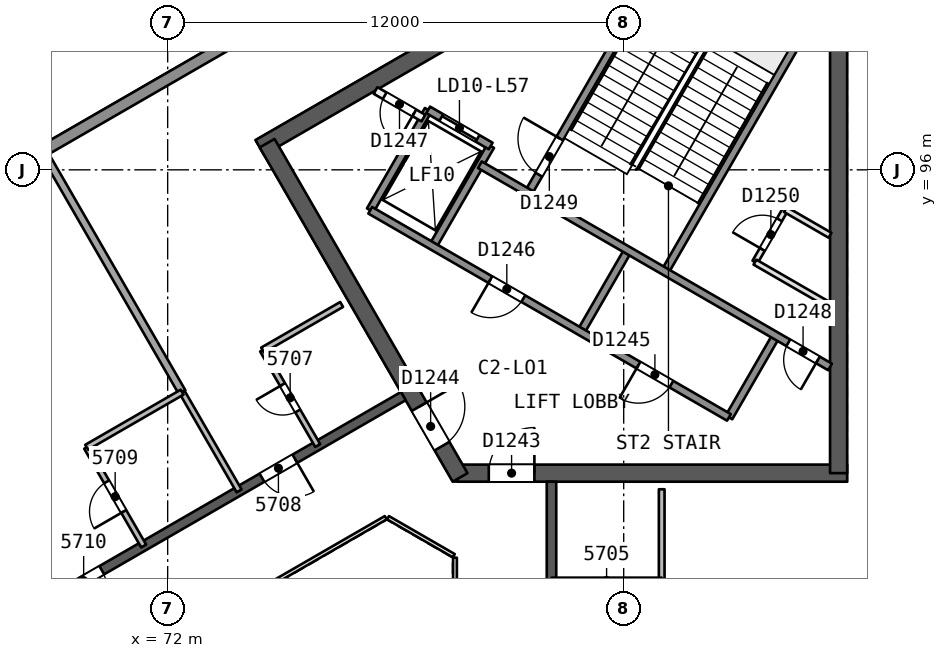
"""IFC4 building model, lengths in metres.
Left out: names, types, materials, properties, quantities, classifications, styles, units other than length and angle.
Written with IfcOpenShell. Run it as: python <this file> out.ifc"""

import sys

from ifc_helpers import new_model, si_unit, direction, frame, frame_2d, origin, place, context, subcontext, project, spatial, rectangle, extrude, element, fill, save


model = new_model("IFC4")
c1 = context("Model", 3, precision=1e-05, world=origin(), true_north=direction((0.0, 1.0)))
c2 = subcontext(c1, "Body", "Model", "MODEL_VIEW")
j1 = project(units=[si_unit("LENGTHUNIT", "METRE"), si_unit("PLANEANGLEUNIT", "RADIAN")], contexts=[c1])
p1 = place(None, origin())
s1 = spatial("IfcSite", under=j1, at=p1, CompositionType="ELEMENT")
p2 = place(p1, origin())
s2 = spatial("IfcBuilding", under=s1, at=p2, CompositionType="ELEMENT")
p3 = place(p2, frame((0.0, 0.0, 231.7)))
s3 = spatial("IfcBuildingStorey", under=s2, at=p3, CompositionType="ELEMENT", Elevation=231.7)
p4 = place(p3, frame((79.63, 88.019, 0.0), z_axis=(0.0, 0.0, 1.0), x_axis=(1.0, 0.0, 0.0)))
e1 = element("IfcWall", 1, at=p4, inside=s3, PredefinedType="SHEAR", context=c2, shape_type="SweptSolid", body=[
    extrude(rectangle(XDim=10.25, YDim=0.45, at=frame_2d((5.125, 0.0))), origin(), (0.0, 0.0, 1.0), 3.7),
])
p5 = place(p4, frame((0.82, 0.0, 0.0)))
e2 = element("IfcOpeningElement", 2, at=p5, cuts=e1, PredefinedType="OPENING", context=c2, shape_type="SweptSolid", body=[
    extrude(rectangle(XDim=1.2, YDim=2.1, at=frame_2d((0.6, 1.05))), frame((0.0, 0.235, 0.0), z_axis=(0.0, -1.0, 0.0), x_axis=(1.0, 0.0, 0.0)), (0.0, 0.0, 1.0), 0.471),
])
p6 = place(p3, frame((89.655, 88.019, 0.0), z_axis=(0.0, 0.0, 1.0), x_axis=(0.0, 1.0, 0.0)))
e3 = element("IfcWall", 3, at=p6, inside=s3, PredefinedType="SHEAR", context=c2, shape_type="SweptSolid", body=[
    extrude(rectangle(XDim=14.108, YDim=0.45, at=frame_2d((7.054, 0.0))), origin(), (0.0, 0.0, 1.0), 3.7),
])
p7 = place(p3, frame((86.723, 103.69, 0.0), z_axis=(0.0, 0.0, 1.0), x_axis=(-0.866022713978, -0.500004658852, 0.0)))
e4 = element("IfcWall", 4, at=p7, inside=s3, PredefinedType="SHEAR", context=c2, shape_type="SweptSolid", body=[
    extrude(rectangle(XDim=14.203, YDim=0.45, at=frame_2d((7.102, 0.0))), origin(), (0.0, 0.0, 1.0), 3.7),
])
p8 = place(p3, frame((74.617, 96.701, 0.0), z_axis=(0.0, 0.0, 1.0), x_axis=(0.499994385119, -0.866028645513, 0.0)))
e5 = element("IfcWall", 5, at=p8, inside=s3, PredefinedType="SHEAR", context=c2, shape_type="SweptSolid", body=[
    extrude(rectangle(XDim=10.155, YDim=0.45, at=frame_2d((5.077, 0.0))), origin(), (0.0, 0.0, 1.0), 3.7),
])
p9 = place(p8, frame((8.005, 0.0, 0.0)))
e6 = element("IfcOpeningElement", 6, at=p9, cuts=e5, PredefinedType="OPENING", context=c2, shape_type="SweptSolid", body=[
    extrude(rectangle(XDim=1.2, YDim=2.1, at=frame_2d((0.6, 1.05))), frame((0.0, 0.235, 0.0), z_axis=(0.0, -1.0, 0.0), x_axis=(1.0, 0.0, 0.0)), (0.0, 0.0, 1.0), 0.471),
])
p10 = place(p3, frame((82.1, 72.206, 0.0), z_axis=(0.0, 0.0, 1.0), x_axis=(0.0, 1.0, 0.0)))
e7 = element("IfcWall", 7, at=p10, inside=s3, PredefinedType="SHEAR", context=c2, shape_type="SweptSolid", body=[
    extrude(rectangle(XDim=15.588, YDim=0.25, at=frame_2d((7.794, 0.0))), origin(), (0.0, 0.0, 1.0), 3.3),
])
p11 = place(p10, frame((2.15, 0.0, 0.0)))
e8 = element("IfcOpeningElement", 8, at=p11, cuts=e7, PredefinedType="OPENING", context=c2, shape_type="SweptSolid", body=[
    extrude(rectangle(XDim=1.0, YDim=2.1, at=frame_2d((0.5, 1.05))), frame((0.0, 0.135, 0.0), z_axis=(0.0, -1.0, 0.0), x_axis=(1.0, 0.0, 0.0)), (0.0, 0.0, 1.0), 0.271),
])
p12 = place(p10, frame((7.662, 0.0, 0.0)))
e9 = element("IfcOpeningElement", 9, at=p12, cuts=e7, PredefinedType="OPENING", context=c2, shape_type="SweptSolid", body=[
    extrude(rectangle(XDim=1.2, YDim=2.4, at=frame_2d((0.6, 1.2))), frame((0.0, 0.135, 0.0), z_axis=(0.0, -1.0, 0.0), x_axis=(1.0, 0.0, 0.0)), (0.0, 0.0, 1.0), 0.271),
])
p13 = place(p10, frame((11.606, 0.0, 0.0)))
e10 = element("IfcOpeningElement", 10, at=p13, cuts=e7, PredefinedType="OPENING", context=c2, shape_type="SweptSolid", body=[
    extrude(rectangle(XDim=1.0, YDim=2.1, at=frame_2d((0.5, 1.05))), frame((0.0, 0.135, 0.0), z_axis=(0.0, -1.0, 0.0), x_axis=(1.0, 0.0, 0.0)), (0.0, 0.0, 1.0), 0.271),
])
p14 = place(p3, frame((78.2, 90.046, 0.0), z_axis=(0.0, 0.0, 1.0), x_axis=(-0.866026492143, -0.499998114903, 0.0)))
e11 = element("IfcWall", 11, at=p14, inside=s3, PredefinedType="SHEAR", context=c2, shape_type="SweptSolid", body=[
    extrude(rectangle(XDim=15.588, YDim=0.25, at=frame_2d((7.794, 0.0))), origin(), (0.0, 0.0, 1.0), 3.3),
])
p15 = place(p14, frame((3.294, 0.0, 0.0)))
e12 = element("IfcOpeningElement", 12, at=p15, cuts=e11, PredefinedType="OPENING", context=c2, shape_type="SweptSolid", body=[
    extrude(rectangle(XDim=1.0, YDim=2.1, at=frame_2d((0.5, 1.05))), frame((0.0, 0.135, 0.0), z_axis=(0.0, -1.0, 0.0), x_axis=(1.0, 0.0, 0.0)), (0.0, 0.0, 1.0), 0.271),
])
p16 = place(p14, frame((9.162, 0.0, 0.0)))
e13 = element("IfcOpeningElement", 13, at=p16, cuts=e11, PredefinedType="OPENING", context=c2, shape_type="SweptSolid", body=[
    extrude(rectangle(XDim=1.1, YDim=2.1, at=frame_2d((0.55, 1.05))), frame((0.0, 0.135, 0.0), z_axis=(0.0, -1.0, 0.0), x_axis=(1.0, 0.0, 0.0)), (0.0, 0.0, 1.0), 0.271),
])
p17 = place(p14, frame((11.762, 0.0, 0.0)))
e14 = element("IfcOpeningElement", 14, at=p17, cuts=e11, PredefinedType="OPENING", context=c2, shape_type="SweptSolid", body=[
    extrude(rectangle(XDim=1.0, YDim=2.1, at=frame_2d((0.5, 1.05))), frame((0.0, 0.135, 0.0), z_axis=(0.0, -1.0, 0.0), x_axis=(1.0, 0.0, 0.0)), (0.0, 0.0, 1.0), 0.271),
])
p18 = place(p3, frame((85.0, 87.595, 0.0), z_axis=(0.0, 0.0, 1.0), x_axis=(0.0, -1.0, 0.0)))
e15 = element("IfcWall", 15, at=p18, inside=s3, PredefinedType="PARTITIONING", context=c2, shape_type="SweptSolid", body=[
    extrude(rectangle(XDim=2.401, YDim=0.15, at=frame_2d((1.2, 0.0))), origin(), (0.0, 0.0, 1.0), 3.3),
])
p19 = place(p3, frame((85.0, 85.194, 0.0), z_axis=(0.0, 0.0, 1.0), x_axis=(-1.0, 0.0, 0.0)))
e16 = element("IfcWall", 16, at=p19, inside=s3, PredefinedType="PARTITIONING", context=c2, shape_type="SweptSolid", body=[
    extrude(rectangle(XDim=2.9, YDim=0.15, at=frame_2d((1.45, 0.0))), origin(), (0.0, 0.0, 1.0), 3.3),
])
p20 = place(p19, frame((1.05, 0.0, 0.0)))
e17 = element("IfcOpeningElement", 17, at=p20, cuts=e16, PredefinedType="OPENING", context=c2, shape_type="SweptSolid", body=[
    extrude(rectangle(XDim=0.8, YDim=2.1, at=frame_2d((0.4, 1.05))), frame((0.0, 0.085, 0.0), z_axis=(0.0, -1.0, 0.0), x_axis=(1.0, 0.0, 0.0)), (0.0, 0.0, 1.0), 0.171),
])
p21 = place(p3, frame((75.948, 88.746, 0.0), z_axis=(0.0, 0.0, 1.0), x_axis=(-0.499987231761, 0.866032775405, 0.0)))
e18 = element("IfcWall", 18, at=p21, inside=s3, PredefinedType="PARTITIONING", context=c2, shape_type="SweptSolid", body=[
    extrude(rectangle(XDim=2.9, YDim=0.15, at=frame_2d((1.45, 0.0))), origin(), (0.0, 0.0, 1.0), 3.3),
])
p22 = place(p21, frame((1.05, 0.0, 0.0)))
e19 = element("IfcOpeningElement", 19, at=p22, cuts=e18, PredefinedType="OPENING", context=c2, shape_type="SweptSolid", body=[
    extrude(rectangle(XDim=0.8, YDim=2.1, at=frame_2d((0.4, 1.05))), frame((0.0, 0.085, 0.0), z_axis=(0.0, -1.0, 0.0), x_axis=(1.0, 0.0, 0.0)), (0.0, 0.0, 1.0), 0.171),
])
p23 = place(p3, frame((74.498, 91.257, 0.0), z_axis=(0.0, 0.0, 1.0), x_axis=(0.866038271014, 0.499977712642, 0.0)))
e20 = element("IfcWall", 20, at=p23, inside=s3, PredefinedType="PARTITIONING", context=c2, shape_type="SweptSolid", body=[
    extrude(rectangle(XDim=2.401, YDim=0.15, at=frame_2d((1.2, 0.0))), origin(), (0.0, 0.0, 1.0), 3.3),
])
p24 = place(p3, frame((68.791, 96.367, 0.0), z_axis=(0.0, 0.0, 1.0), x_axis=(0.499994271117, -0.866028711331, 0.0)))
e21 = element("IfcWall", 21, at=p24, inside=s3, PredefinedType="PARTITIONING", context=c2, shape_type="SweptSolid", body=[
    extrude(rectangle(XDim=7.179, YDim=0.2, at=frame_2d((3.589, 0.0))), origin(), (0.0, 0.0, 1.0), 3.3),
])
p25 = place(p3, frame((72.38, 90.15, 0.0), z_axis=(0.0, 0.0, 1.0), x_axis=(0.499990139034, -0.866031096941, 0.0)))
e22 = element("IfcWall", 22, at=p25, inside=s3, PredefinedType="PARTITIONING", context=c2, shape_type="SweptSolid", body=[
    extrude(rectangle(XDim=3.0, YDim=0.15, at=frame_2d((1.5, 0.0))), origin(), (0.0, 0.0, 1.0), 3.3),
])
p26 = place(p3, frame((71.368, 86.102, 0.0), z_axis=(0.0, 0.0, 1.0), x_axis=(-0.50002537861, 0.866010750942, 0.0)))
e23 = element("IfcWall", 23, at=p26, inside=s3, PredefinedType="PARTITIONING", context=c2, shape_type="SweptSolid", body=[
    extrude(rectangle(XDim=3.0, YDim=0.15, at=frame_2d((1.5, 0.0))), origin(), (0.0, 0.0, 1.0), 3.3),
])
p27 = place(p26, frame((1.05, 0.0, 0.0)))
e24 = element("IfcOpeningElement", 24, at=p27, cuts=e23, PredefinedType="OPENING", context=c2, shape_type="SweptSolid", body=[
    extrude(rectangle(XDim=0.9, YDim=2.1, at=frame_2d((0.45, 1.05))), frame((0.0, 0.085, 0.0), z_axis=(0.0, -1.0, 0.0), x_axis=(1.0, 0.0, 0.0)), (0.0, 0.0, 1.0), 0.171),
])
p28 = place(p3, frame((69.868, 88.7, 0.0), z_axis=(0.0, 0.0, 1.0), x_axis=(0.865996321171, 0.50005036918, 0.0)))
e25 = element("IfcWall", 25, at=p28, inside=s3, PredefinedType="PARTITIONING", context=c2, shape_type="SweptSolid", body=[
    extrude(rectangle(XDim=2.9, YDim=0.15, at=frame_2d((1.45, 0.0))), origin(), (0.0, 0.0, 1.0), 3.3),
])
p29 = place(p3, frame((44.584, 82.563, 0.0), z_axis=(0.0, 0.0, 1.0), x_axis=(0.866023992326, 0.500002444709, 0.0)))
e26 = element("IfcWall", 26, at=p29, inside=s3, PredefinedType="SOLIDWALL", context=c2, shape_type="SweptSolid", body=[
    extrude(rectangle(XDim=50.118, YDim=0.3, at=frame_2d((25.059, 0.0))), origin(), (0.0, 0.0, 1.0), 3.3),
])
p30 = place(p29, frame((23.391, 0.0, 0.0)))
e27 = element("IfcOpeningElement", 27, at=p30, cuts=e26, PredefinedType="OPENING", context=c2, shape_type="SweptSolid", body=[
    extrude(rectangle(XDim=2.4, YDim=2.4, at=frame_2d((1.2, 1.2))), frame((0.0, 0.161, 0.0), z_axis=(0.0, -1.0, 0.0), x_axis=(1.0, 0.0, 0.0)), (0.0, 0.0, 1.0), 0.321),
])
p31 = place(p29, frame((37.835, 0.0, 0.0)))
e28 = element("IfcOpeningElement", 28, at=p31, cuts=e26, PredefinedType="OPENING", context=c2, shape_type="SweptSolid", body=[
    extrude(rectangle(XDim=2.4, YDim=2.4, at=frame_2d((1.2, 1.2))), frame((0.0, 0.161, 0.0), z_axis=(0.0, -1.0, 0.0), x_axis=(1.0, 0.0, 0.0)), (0.0, 0.0, 1.0), 0.321),
])
p32 = place(p29, frame((9.416, 0.0, 0.0)))
e29 = element("IfcOpeningElement", 29, at=p32, cuts=e26, PredefinedType="OPENING", context=c2, shape_type="SweptSolid", body=[
    extrude(rectangle(XDim=2.4, YDim=2.4, at=frame_2d((1.2, 1.2))), frame((0.0, 0.161, 0.0), z_axis=(0.0, -1.0, 0.0), x_axis=(1.0, 0.0, 0.0)), (0.0, 0.0, 1.0), 0.321),
])
p33 = place(p3, frame((86.77, 89.486, 0.0), z_axis=(0.0, 0.0, 1.0), x_axis=(0.499961042966, 0.86604789447, 0.0)))
e30 = element("IfcWall", 30, at=p33, inside=s3, PredefinedType="SOLIDWALL", context=c2, shape_type="SweptSolid", body=[
    extrude(rectangle(XDim=2.48, YDim=0.2, at=frame_2d((1.24, 0.0))), origin(), (0.0, 0.0, 1.0), 3.3),
])
p34 = place(p3, frame((87.454, 93.571, 0.0), z_axis=(0.0, 0.0, 1.0), x_axis=(0.499995408039, 0.866028054938, 0.0)))
e31 = element("IfcWall", 31, at=p34, inside=s3, PredefinedType="PARTITIONING", context=c2, shape_type="SweptSolid", body=[
    extrude(rectangle(XDim=1.6, YDim=0.15, at=frame_2d((0.8, 0.0))), origin(), (0.0, 0.0, 1.0), 3.3),
])
p35 = place(p34, frame((0.387, 0.0, 0.0)))
e32 = element("IfcOpeningElement", 32, at=p35, cuts=e31, PredefinedType="OPENING", context=c2, shape_type="SweptSolid", body=[
    extrude(rectangle(XDim=0.9, YDim=2.1, at=frame_2d((0.45, 1.05))), frame((0.0, 0.085, 0.0), z_axis=(0.0, -1.0, 0.0), x_axis=(1.0, 0.0, 0.0)), (0.0, 0.0, 1.0), 0.171),
])
p36 = place(p3, frame((85.087, 93.321, 0.0), z_axis=(0.0, 0.0, 1.0), x_axis=(0.500019787375, 0.866013979237, 0.0)))
e33 = element("IfcWall", 33, at=p36, inside=s3, PredefinedType="SOLIDWALL", context=c2, shape_type="SweptSolid", body=[
    extrude(rectangle(XDim=7.7, YDim=0.2, at=frame_2d((3.85, 0.0))), origin(), (0.0, 0.0, 1.0), 3.3),
])
p37 = place(p3, frame((82.873, 91.736, 0.0), z_axis=(0.0, 0.0, 1.0), x_axis=(0.499961042966, 0.86604789447, 0.0)))
e34 = element("IfcWall", 34, at=p37, inside=s3, PredefinedType="SOLIDWALL", context=c2, shape_type="SweptSolid", body=[
    extrude(rectangle(XDim=2.48, YDim=0.2, at=frame_2d((1.24, 0.0))), origin(), (0.0, 0.0, 1.0), 3.3),
])
p38 = place(p3, frame((81.493, 95.396, 0.0), z_axis=(0.0, 0.0, 1.0), x_axis=(0.500006057782, 0.866021906294, 0.0)))
e35 = element("IfcWall", 35, at=p38, inside=s3, PredefinedType="SOLIDWALL", context=c2, shape_type="SweptSolid", body=[
    extrude(rectangle(XDim=7.7, YDim=0.2, at=frame_2d((3.85, 0.0))), origin(), (0.0, 0.0, 1.0), 3.3),
])
p39 = place(p38, frame((0.55, 0.0, 0.0)))
e36 = element("IfcOpeningElement", 36, at=p39, cuts=e35, PredefinedType="OPENING", context=c2, shape_type="SweptSolid", body=[
    extrude(rectangle(XDim=1.1, YDim=2.1, at=frame_2d((0.55, 1.05))), frame((0.0, 0.11, 0.0), z_axis=(0.0, -1.0, 0.0), x_axis=(1.0, 0.0, 0.0)), (0.0, 0.0, 1.0), 0.221),
])
for number, where, z_axis, x_axis in (
    (37, (78.976, 93.986, 0.0), (0.0, 0.0, 1.0), (0.5, 0.866, 0.0)),
    (38, (77.33, 94.936, 0.0), (0.0, 0.0, 1.0), (0.5, 0.866, 0.0)),
):
    element("IfcWall", number, at=place(p3, frame(where, z_axis=z_axis, x_axis=x_axis)), inside=s3, PredefinedType="SOLIDWALL", context=c2, shape_type="SweptSolid", body=[
        extrude(rectangle(XDim=3.05, YDim=0.2, at=frame_2d((1.525, 0.0))), origin(), (0.0, 0.0, 1.0), 3.3),
    ])
p40 = place(p3, frame((86.77, 89.486, 0.0), z_axis=(0.0, 0.0, 1.0), x_axis=(-0.86601811187, 0.500012629753, 0.0)))
e39 = element("IfcWall", 39, at=p40, inside=s3, PredefinedType="SOLIDWALL", context=c2, shape_type="SweptSolid", body=[
    extrude(rectangle(XDim=10.9, YDim=0.2, at=frame_2d((5.45, 0.0))), origin(), (0.0, 0.0, 1.0), 3.3),
])
p41 = place(p40, frame((1.75, 0.0, 0.0)))
e40 = element("IfcOpeningElement", 40, at=p41, cuts=e39, PredefinedType="OPENING", context=c2, shape_type="SweptSolid", body=[
    extrude(rectangle(XDim=1.0, YDim=2.1, at=frame_2d((0.5, 1.05))), frame((0.0, 0.11, 0.0), z_axis=(0.0, -1.0, 0.0), x_axis=(1.0, 0.0, 0.0)), (0.0, 0.0, 1.0), 0.221),
])
p42 = place(p40, frame((6.25, 0.0, 0.0)))
e41 = element("IfcOpeningElement", 41, at=p42, cuts=e39, PredefinedType="OPENING", context=c2, shape_type="SweptSolid", body=[
    extrude(rectangle(XDim=1.0, YDim=2.1, at=frame_2d((0.5, 1.05))), frame((0.0, 0.11, 0.0), z_axis=(0.0, -1.0, 0.0), x_axis=(1.0, 0.0, 0.0)), (0.0, 0.0, 1.0), 0.221),
])
p43 = place(p3, frame((89.43, 90.814, 0.0), z_axis=(0.0, 0.0, 1.0), x_axis=(-0.866018983788, 0.500011119594, 0.0)))
e42 = element("IfcWall", 42, at=p43, inside=s3, PredefinedType="SOLIDWALL", context=c2, shape_type="SweptSolid", body=[
    extrude(rectangle(XDim=10.64, YDim=0.2, at=frame_2d((5.32, 0.0))), origin(), (0.0, 0.0, 1.0), 3.3),
])
p44 = place(p43, frame((0.37, 0.0, 0.0)))
e43 = element("IfcOpeningElement", 43, at=p44, cuts=e42, PredefinedType="OPENING", context=c2, shape_type="SweptSolid", body=[
    extrude(rectangle(XDim=0.9, YDim=2.1, at=frame_2d((0.45, 1.05))), frame((0.0, 0.11, 0.0), z_axis=(0.0, -1.0, 0.0), x_axis=(1.0, 0.0, 0.0)), (0.0, 0.0, 1.0), 0.221),
])
p45 = place(p3, frame((78.73, 97.361, 0.0), z_axis=(0.0, 0.0, 1.0), x_axis=(-0.866045896294, 0.499964504253, 0.0)))
e44 = element("IfcWall", 44, at=p45, inside=s3, PredefinedType="PARTITIONING", context=c2, shape_type="SweptSolid", body=[
    extrude(rectangle(XDim=1.455, YDim=0.2, at=frame_2d((0.728, 0.0))), origin(), (0.0, 0.0, 1.0), 3.3),
])
p46 = place(p45, frame((0.278, 0.0, 0.0)))
e45 = element("IfcOpeningElement", 45, at=p46, cuts=e44, PredefinedType="OPENING", context=c2, shape_type="SweptSolid", body=[
    extrude(rectangle(XDim=0.9, YDim=2.1, at=frame_2d((0.45, 1.05))), frame((0.0, 0.11, 0.0), z_axis=(0.0, -1.0, 0.0), x_axis=(1.0, 0.0, 0.0)), (0.0, 0.0, 1.0), 0.221),
])
p47 = place(p3, frame((80.5, 96.627, 0.0), z_axis=(0.0, 0.0, 1.0), x_axis=(-0.86601224135, 0.500022797313, 0.0)))
e46 = element("IfcWall", 46, at=p47, inside=s3, PredefinedType="SOLIDWALL", context=c2, shape_type="SweptSolid", body=[
    extrude(rectangle(XDim=1.9, YDim=0.2, at=frame_2d((0.95, 0.0))), origin(), (0.0, 0.0, 1.0), 3.3),
])
p48 = place(p47, frame((0.4, 0.0, 0.0)))
e47 = element("IfcOpeningElement", 47, at=p48, cuts=e46, PredefinedType="OPENING", context=c2, shape_type="SweptSolid", body=[
    extrude(rectangle(XDim=1.1, YDim=2.1, at=frame_2d((0.55, 1.05))), frame((0.0, 0.11, 0.0), z_axis=(0.0, -1.0, 0.0), x_axis=(1.0, 0.0, 0.0)), (0.0, 0.0, 1.0), 0.221),
])
p49 = place(p3, frame((89.43, 92.43, 0.0), z_axis=(0.0, 0.0, 1.0), x_axis=(-0.866048373726, 0.499960212783, 0.0)))
e48 = element("IfcWall", 48, at=p49, inside=s3, PredefinedType="PARTITIONING", context=c2, shape_type="SweptSolid", body=[
    extrude(rectangle(XDim=2.281, YDim=0.15, at=frame_2d((1.141, 0.0))), origin(), (0.0, 0.0, 1.0), 3.3),
])
p50 = place(p3, frame((89.43, 94.278, 0.0), z_axis=(0.0, 0.0, 1.0), x_axis=(-0.865987941628, 0.500064880745, 0.0)))
e49 = element("IfcWall", 49, at=p50, inside=s3, PredefinedType="PARTITIONING", context=c2, shape_type="SweptSolid", body=[
    extrude(rectangle(XDim=1.358, YDim=0.15, at=frame_2d((0.679, 0.0))), origin(), (0.0, 0.0, 1.0), 3.3),
])
p51 = place(p3, frame((79.56, 74.206, 0.0), z_axis=(0.0, 0.0, 1.0), x_axis=(0.0, 1.0, 0.0)))
e50 = element("IfcWall", 50, at=p51, inside=s3, PredefinedType="PARTITIONING", context=c2, shape_type="SweptSolid", body=[
    extrude(rectangle(XDim=11.588, YDim=0.1, at=frame_2d((5.794, 0.0))), origin(), (0.0, 0.0, 1.0), 3.3),
])
p52 = place(p3, frame((79.53, 85.846, 0.0), z_axis=(0.0, 0.0, 1.0), x_axis=(-0.866041268327, 0.499972520799, 0.0)))
e51 = element("IfcWall", 51, at=p52, inside=s3, PredefinedType="PARTITIONING", context=c2, shape_type="SweptSolid", body=[
    extrude(rectangle(XDim=2.0, YDim=0.1, at=frame_2d((1.0, 0.0))), origin(), (0.0, 0.0, 1.0), 3.3),
])
p53 = place(p3, frame((77.738, 86.846, 0.0), z_axis=(0.0, 0.0, 1.0), x_axis=(-0.866026658274, -0.499997827154, 0.0)))
e52 = element("IfcWall", 52, at=p53, inside=s3, PredefinedType="PARTITIONING", context=c2, shape_type="SweptSolid", body=[
    extrude(rectangle(XDim=11.588, YDim=0.1, at=frame_2d((5.794, 0.0))), origin(), (0.0, 0.0, 1.0), 3.3),
])
p54 = place(p22, origin())
e53 = element("IfcDoor", 53, at=p54, inside=s3, OperationType="SINGLE_SWING_RIGHT", PredefinedType="NOTDEFINED", context=c2, shape_type="SweptSolid", body=[
    extrude(rectangle(XDim=0.8, YDim=2.1, at=frame_2d((0.4, 1.05))), frame((0.0, 0.025, 0.0), z_axis=(0.0, -1.0, 0.0), x_axis=(1.0, 0.0, 0.0)), (0.0, 0.0, 1.0), 0.05),
])
fill(e19, e53)
p55 = place(p15, origin())
e54 = element("IfcDoor", 54, at=p55, inside=s3, OperationType="SINGLE_SWING_LEFT", PredefinedType="NOTDEFINED", context=c2, shape_type="SweptSolid", body=[
    extrude(rectangle(XDim=1.0, YDim=2.1, at=frame_2d((0.5, 1.05))), frame((0.0, 0.025, 0.0), z_axis=(0.0, -1.0, 0.0), x_axis=(1.0, 0.0, 0.0)), (0.0, 0.0, 1.0), 0.05),
])
fill(e12, e54)
p56 = place(p27, origin())
e55 = element("IfcDoor", 55, at=p56, inside=s3, OperationType="SINGLE_SWING_LEFT", PredefinedType="NOTDEFINED", context=c2, shape_type="SweptSolid", body=[
    extrude(rectangle(XDim=0.9, YDim=2.1, at=frame_2d((0.45, 1.05))), frame((0.0, 0.025, 0.0), z_axis=(0.0, -1.0, 0.0), x_axis=(1.0, 0.0, 0.0)), (0.0, 0.0, 1.0), 0.05),
])
fill(e24, e55)
p57 = place(p16, origin())
e56 = element("IfcDoor", 56, at=p57, inside=s3, OperationType="SINGLE_SWING_RIGHT", PredefinedType="NOTDEFINED", context=c2, shape_type="SweptSolid", body=[
    extrude(rectangle(XDim=1.1, YDim=2.1, at=frame_2d((0.55, 1.05))), frame((0.0, 0.025, 0.0), z_axis=(0.0, -1.0, 0.0), x_axis=(1.0, 0.0, 0.0)), (0.0, 0.0, 1.0), 0.05),
])
fill(e13, e56)
p58 = place(p5, origin())
e57 = element("IfcDoor", 57, at=p58, inside=s3, OperationType="SINGLE_SWING_RIGHT", PredefinedType="NOTDEFINED", context=c2, shape_type="SweptSolid", body=[
    extrude(rectangle(XDim=1.2, YDim=2.1, at=frame_2d((0.6, 1.05))), frame((0.0, 0.025, 0.0), z_axis=(0.0, -1.0, 0.0), x_axis=(1.0, 0.0, 0.0)), (0.0, 0.0, 1.0), 0.05),
])
fill(e2, e57)
p59 = place(p9, origin())
e58 = element("IfcDoor", 58, at=p59, inside=s3, OperationType="SINGLE_SWING_LEFT", PredefinedType="NOTDEFINED", context=c2, shape_type="SweptSolid", body=[
    extrude(rectangle(XDim=1.2, YDim=2.1, at=frame_2d((0.6, 1.05))), frame((0.0, 0.025, 0.0), z_axis=(0.0, -1.0, 0.0), x_axis=(1.0, 0.0, 0.0)), (0.0, 0.0, 1.0), 0.05),
])
fill(e6, e58)
p60 = place(p48, origin())
e59 = element("IfcDoor", 59, at=p60, inside=s3, OperationType="SLIDING_TO_RIGHT", PredefinedType="NOTDEFINED", context=c2, shape_type="SweptSolid", body=[
    extrude(rectangle(XDim=1.1, YDim=2.1, at=frame_2d((0.55, 1.05))), frame((0.0, 0.025, 0.0), z_axis=(0.0, -1.0, 0.0), x_axis=(1.0, 0.0, 0.0)), (0.0, 0.0, 1.0), 0.05),
])
fill(e47, e59)
p61 = place(p41, origin())
e60 = element("IfcDoor", 60, at=p61, inside=s3, OperationType="SINGLE_SWING_RIGHT", PredefinedType="NOTDEFINED", context=c2, shape_type="SweptSolid", body=[
    extrude(rectangle(XDim=1.0, YDim=2.1, at=frame_2d((0.5, 1.05))), frame((0.0, 0.025, 0.0), z_axis=(0.0, -1.0, 0.0), x_axis=(1.0, 0.0, 0.0)), (0.0, 0.0, 1.0), 0.05),
])
fill(e40, e60)
p62 = place(p42, origin())
e61 = element("IfcDoor", 61, at=p62, inside=s3, OperationType="SINGLE_SWING_RIGHT", PredefinedType="NOTDEFINED", context=c2, shape_type="SweptSolid", body=[
    extrude(rectangle(XDim=1.0, YDim=2.1, at=frame_2d((0.5, 1.05))), frame((0.0, 0.025, 0.0), z_axis=(0.0, -1.0, 0.0), x_axis=(1.0, 0.0, 0.0)), (0.0, 0.0, 1.0), 0.05),
])
fill(e41, e61)
p63 = place(p46, origin())
e62 = element("IfcDoor", 62, at=p63, inside=s3, OperationType="SINGLE_SWING_LEFT", PredefinedType="NOTDEFINED", context=c2, shape_type="SweptSolid", body=[
    extrude(rectangle(XDim=0.9, YDim=2.1, at=frame_2d((0.45, 1.05))), frame((0.0, 0.025, 0.0), z_axis=(0.0, -1.0, 0.0), x_axis=(1.0, 0.0, 0.0)), (0.0, 0.0, 1.0), 0.05),
])
fill(e45, e62)
p64 = place(p44, origin())
e63 = element("IfcDoor", 63, at=p64, inside=s3, OperationType="SINGLE_SWING_LEFT", PredefinedType="NOTDEFINED", context=c2, shape_type="SweptSolid", body=[
    extrude(rectangle(XDim=0.9, YDim=2.1, at=frame_2d((0.45, 1.05))), frame((0.0, 0.025, 0.0), z_axis=(0.0, -1.0, 0.0), x_axis=(1.0, 0.0, 0.0)), (0.0, 0.0, 1.0), 0.05),
])
fill(e43, e63)
p65 = place(p39, origin())
e64 = element("IfcDoor", 64, at=p65, inside=s3, OperationType="SINGLE_SWING_RIGHT", PredefinedType="NOTDEFINED", context=c2, shape_type="SweptSolid", body=[
    extrude(rectangle(XDim=1.1, YDim=2.1, at=frame_2d((0.55, 1.05))), frame((0.0, 0.025, 0.0), z_axis=(0.0, -1.0, 0.0), x_axis=(1.0, 0.0, 0.0)), (0.0, 0.0, 1.0), 0.05),
])
fill(e36, e64)
p66 = place(p35, origin())
e65 = element("IfcDoor", 65, at=p66, inside=s3, OperationType="SINGLE_SWING_LEFT", PredefinedType="NOTDEFINED", context=c2, shape_type="SweptSolid", body=[
    extrude(rectangle(XDim=0.9, YDim=2.1, at=frame_2d((0.45, 1.05))), frame((0.0, 0.025, 0.0), z_axis=(0.0, -1.0, 0.0), x_axis=(1.0, 0.0, 0.0)), (0.0, 0.0, 1.0), 0.05),
])
fill(e32, e65)
save(model, sys.argv[1])
